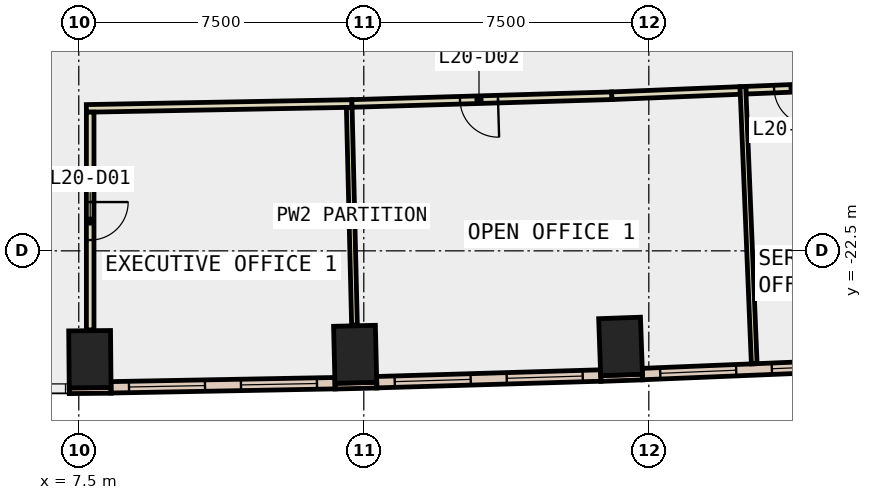
"""IFC4 building model, lengths in metres.
Left out: names, types, materials, properties, quantities, classifications, styles, units other than length and angle.
Written with IfcOpenShell. Run it as: python <this file> out.ifc"""

import sys

from ifc_helpers import new_model, si_unit, direction, frame, frame_2d, origin, origin_2d, place, context, subcontext, project, spatial, rectangle, extrude, element, fill, save


model = new_model("IFC4")
c1 = context("Model", 3, precision=1e-05, world=origin(), true_north=direction((0.0, 1.0)))
c2 = subcontext(c1, "Body", "Model", "MODEL_VIEW")
j1 = project(units=[si_unit("LENGTHUNIT", "METRE"), si_unit("PLANEANGLEUNIT", "RADIAN")], contexts=[c1])
p1 = place(None, origin())
s1 = spatial("IfcSite", under=j1, at=p1, CompositionType="ELEMENT")
p2 = place(p1, origin())
s2 = spatial("IfcBuilding", under=s1, at=p2, CompositionType="ELEMENT")
p3 = place(p2, frame((0.0, 0.0, 95.0)))
s3 = spatial("IfcBuildingStorey", under=s2, at=p3, CompositionType="ELEMENT", Elevation=95.0)
for number, where, z_axis, x_axis in (
    (1, (7.792, -25.351, -0.4), (0.0, 0.0, 1.0), (1.0, 0.009, 0.0)),
    (2, (14.773, -25.222, -0.4), (0.0, 0.0, 1.0), (1.0, 0.024, 0.0)),
    (3, (21.757, -25.015, -0.4), (0.0, 0.0, 1.0), (0.999, 0.035, 0.0)),
):
    element("IfcColumn", number, at=place(p3, frame(where, z_axis=z_axis, x_axis=x_axis)), inside=s3, PredefinedType="COLUMN", context=c2, shape_type="SweptSolid", body=[
        extrude(rectangle(XDim=1.1, YDim=1.5, at=origin_2d()), origin(), (0.0, 0.0, 1.0), 4.2),
    ])
p4 = place(p3, frame((7.249, -26.181, 0.0), z_axis=(0.0, 0.0, 1.0), x_axis=(0.99995860686, 0.009098602504, 0.0)))
e4 = element("IfcWall", 4, at=p4, inside=s3, PredefinedType="STANDARD", context=c2, shape_type="SweptSolid", body=[
    extrude(rectangle(XDim=1.1, YDim=0.15, at=frame_2d((0.55, 0.0))), origin(), (0.0, 0.0, 1.0), 3.8),
])
p5 = place(p3, frame((14.243, -26.06, 0.0), z_axis=(0.0, 0.0, 1.0), x_axis=(0.999718180159, 0.023739424163, 0.0)))
e5 = element("IfcWall", 5, at=p5, inside=s3, PredefinedType="STANDARD", context=c2, shape_type="SweptSolid", body=[
    extrude(rectangle(XDim=1.1, YDim=0.15, at=frame_2d((0.55, 0.0))), origin(), (0.0, 0.0, 1.0), 3.8),
])
p6 = place(p3, frame((21.237, -25.859, 0.0), z_axis=(0.0, 0.0, 1.0), x_axis=(0.999376638472, 0.035303462679, 0.0)))
e6 = element("IfcWall", 6, at=p6, inside=s3, PredefinedType="STANDARD", context=c2, shape_type="SweptSolid", body=[
    extrude(rectangle(XDim=1.1, YDim=0.15, at=frame_2d((0.55, 0.0))), origin(), (0.0, 0.0, 1.0), 3.8),
])
p7 = place(p3, frame((8.348, -26.091, 0.0), z_axis=(0.0, 0.0, 1.0), x_axis=(0.999828633111, 0.018512277318, 0.0)))
e7 = element("IfcWall", 7, at=p7, inside=s3, PredefinedType="STANDARD", context=c2, shape_type="SweptSolid", body=[
    extrude(rectangle(XDim=5.895, YDim=0.3, at=frame_2d((2.948, 0.0))), origin(), (0.0, 0.0, 1.0), 3.8),
])
p8 = place(p7, frame((0.474, 0.0, 0.9)))
e8 = element("IfcOpeningElement", 8, at=p8, cuts=e7, PredefinedType="OPENING", context=c2, shape_type="SweptSolid", body=[
    extrude(rectangle(XDim=2.0, YDim=2.6, at=frame_2d((1.0, 1.3))), frame((0.0, 0.16, 0.0), z_axis=(0.0, -1.0, 0.0), x_axis=(1.0, 0.0, 0.0)), (0.0, 0.0, 1.0), 0.32),
])
p9 = place(p7, frame((3.421, 0.0, 0.9)))
e9 = element("IfcOpeningElement", 9, at=p9, cuts=e7, PredefinedType="OPENING", context=c2, shape_type="SweptSolid", body=[
    extrude(rectangle(XDim=2.0, YDim=2.6, at=frame_2d((1.0, 1.3))), frame((0.0, 0.16, 0.0), z_axis=(0.0, -1.0, 0.0), x_axis=(1.0, 0.0, 0.0)), (0.0, 0.0, 1.0), 0.32),
])
p10 = place(p3, frame((15.34, -25.956, 0.0), z_axis=(0.0, 0.0, 1.0), x_axis=(0.999554487555, 0.029846715213, 0.0)))
e10 = element("IfcWall", 10, at=p10, inside=s3, PredefinedType="STANDARD", context=c2, shape_type="SweptSolid", body=[
    extrude(rectangle(XDim=5.898, YDim=0.3, at=frame_2d((2.949, 0.0))), origin(), (0.0, 0.0, 1.0), 3.8),
])
p11 = place(p10, frame((0.474, 0.0, 0.9)))
e11 = element("IfcOpeningElement", 11, at=p11, cuts=e10, PredefinedType="OPENING", context=c2, shape_type="SweptSolid", body=[
    extrude(rectangle(XDim=2.0, YDim=2.6, at=frame_2d((1.0, 1.3))), frame((0.0, 0.16, 0.0), z_axis=(0.0, -1.0, 0.0), x_axis=(1.0, 0.0, 0.0)), (0.0, 0.0, 1.0), 0.32),
])
p12 = place(p10, frame((3.423, 0.0, 0.9)))
e12 = element("IfcOpeningElement", 12, at=p12, cuts=e10, PredefinedType="OPENING", context=c2, shape_type="SweptSolid", body=[
    extrude(rectangle(XDim=2.0, YDim=2.6, at=frame_2d((1.0, 1.3))), frame((0.0, 0.16, 0.0), z_axis=(0.0, -1.0, 0.0), x_axis=(1.0, 0.0, 0.0)), (0.0, 0.0, 1.0), 0.32),
])
p13 = place(p3, frame((22.332, -25.742, 0.0), z_axis=(0.0, 0.0, 1.0), x_axis=(0.999159360905, 0.040994774244, 0.0)))
e13 = element("IfcWall", 13, at=p13, inside=s3, PredefinedType="STANDARD", context=c2, shape_type="SweptSolid", body=[
    extrude(rectangle(XDim=5.878, YDim=0.3, at=frame_2d((2.939, 0.0))), origin(), (0.0, 0.0, 1.0), 3.8),
])
p14 = place(p13, frame((0.469, 0.0, 0.9)))
e14 = element("IfcOpeningElement", 14, at=p14, cuts=e13, PredefinedType="OPENING", context=c2, shape_type="SweptSolid", body=[
    extrude(rectangle(XDim=2.0, YDim=2.6, at=frame_2d((1.0, 1.3))), frame((0.0, 0.16, 0.0), z_axis=(0.0, -1.0, 0.0), x_axis=(1.0, 0.0, 0.0)), (0.0, 0.0, 1.0), 0.32),
])
p15 = place(p13, frame((3.408, 0.0, 0.9)))
e15 = element("IfcOpeningElement", 15, at=p15, cuts=e13, PredefinedType="OPENING", context=c2, shape_type="SweptSolid", body=[
    extrude(rectangle(XDim=2.0, YDim=2.6, at=frame_2d((1.0, 1.3))), frame((0.0, 0.16, 0.0), z_axis=(0.0, -1.0, 0.0), x_axis=(1.0, 0.0, 0.0)), (0.0, 0.0, 1.0), 0.32),
])
p16 = place(p3, frame((14.689, -18.623, 0.0), z_axis=(0.0, 0.0, 1.0), x_axis=(-0.99982995049, -0.01844098976, 0.0)))
e16 = element("IfcWall", 16, at=p16, inside=s3, PredefinedType="PARTITIONING", context=c2, shape_type="SweptSolid", body=[
    extrude(rectangle(XDim=6.99, YDim=0.2, at=frame_2d((3.495, 0.0))), origin(), (0.0, 0.0, 1.0), 3.8),
])
p17 = place(p3, frame((24.904, -18.28, 0.0), z_axis=(0.0, 0.0, 1.0), x_axis=(-0.999156550882, -0.041063205305, 0.0)))
e17 = element("IfcWall", 17, at=p17, inside=s3, PredefinedType="PARTITIONING", context=c2, shape_type="SweptSolid", body=[
    extrude(rectangle(XDim=3.383, YDim=0.2, at=frame_2d((1.691, 0.0))), origin(), (0.0, 0.0, 1.0), 3.8),
])
p18 = place(p3, frame((21.524, -18.419, 0.0), z_axis=(0.0, 0.0, 1.0), x_axis=(-0.999558696746, -0.029705416334, 0.0)))
e18 = element("IfcWall", 18, at=p18, inside=s3, PredefinedType="PARTITIONING", context=c2, shape_type="SweptSolid", body=[
    extrude(rectangle(XDim=6.838, YDim=0.2, at=frame_2d((3.419, 0.0))), origin(), (0.0, 0.0, 1.0), 3.8),
])
p19 = place(p18, frame((2.994, 0.0, 0.0)))
e19 = element("IfcOpeningElement", 19, at=p19, cuts=e18, PredefinedType="OPENING", context=c2, shape_type="SweptSolid", body=[
    extrude(rectangle(XDim=1.0, YDim=2.1, at=frame_2d((0.5, 1.05))), frame((0.0, 0.11, 0.0), z_axis=(0.0, -1.0, 0.0), x_axis=(1.0, 0.0, 0.0)), (0.0, 0.0, 1.0), 0.22),
])
p20 = place(p3, frame((27.538, -18.172, 0.0), z_axis=(0.0, 0.0, 1.0), x_axis=(-0.999161261417, -0.040948427126, 0.0)))
e20 = element("IfcWall", 20, at=p20, inside=s3, PredefinedType="PARTITIONING", context=c2, shape_type="SweptSolid", body=[
    extrude(rectangle(XDim=2.486, YDim=0.2, at=frame_2d((1.243, 0.0))), origin(), (0.0, 0.0, 1.0), 3.8),
])
p21 = place(p20, frame((0.743, 0.0, 0.0)))
e21 = element("IfcOpeningElement", 21, at=p21, cuts=e20, PredefinedType="OPENING", context=c2, shape_type="SweptSolid", body=[
    extrude(rectangle(XDim=1.0, YDim=2.1, at=frame_2d((0.5, 1.05))), frame((0.0, 0.11, 0.0), z_axis=(0.0, -1.0, 0.0), x_axis=(1.0, 0.0, 0.0)), (0.0, 0.0, 1.0), 0.22),
])
p22 = place(p3, frame((7.8, -18.85, 0.0), z_axis=(0.0, 0.0, 1.0), x_axis=(0.0, -1.0, 0.0)))
e22 = element("IfcWall", 22, at=p22, inside=s3, PredefinedType="PARTITIONING", context=c2, shape_type="SweptSolid", body=[
    extrude(rectangle(XDim=5.731, YDim=0.2, at=frame_2d((2.865, 0.0))), origin(), (0.0, 0.0, 1.0), 3.8),
])
p23 = place(p22, frame((2.366, 0.0, 0.0)))
e23 = element("IfcOpeningElement", 23, at=p23, cuts=e22, PredefinedType="OPENING", context=c2, shape_type="SweptSolid", body=[
    extrude(rectangle(XDim=1.0, YDim=2.1, at=frame_2d((0.5, 1.05))), frame((0.0, 0.11, 0.0), z_axis=(0.0, -1.0, 0.0), x_axis=(1.0, 0.0, 0.0)), (0.0, 0.0, 1.0), 0.22),
])
p24 = place(p3, frame((14.617, -18.724, 0.0), z_axis=(0.0, 0.0, 1.0), x_axis=(0.02407553942, -0.999710142192, 0.0)))
e24 = element("IfcWall", 24, at=p24, inside=s3, PredefinedType="PARTITIONING", context=c2, shape_type="SweptSolid", body=[
    extrude(rectangle(XDim=5.729, YDim=0.15, at=frame_2d((2.865, 0.0))), origin(), (0.0, 0.0, 1.0), 3.8),
])
p25 = place(p3, frame((24.975, -18.177, 0.0), z_axis=(0.0, 0.0, 1.0), x_axis=(0.040934999913, -0.999161811611, 0.0)))
e25 = element("IfcWall", 25, at=p25, inside=s3, PredefinedType="PARTITIONING", context=c2, shape_type="SweptSolid", body=[
    extrude(rectangle(XDim=7.3, YDim=0.15, at=frame_2d((3.65, 0.0))), origin(), (0.0, 0.0, 1.0), 3.8),
])
p26 = place(p8, origin())
e26 = element("IfcWindow", 26, at=p26, inside=s3, PartitioningType="SINGLE_PANEL", PredefinedType="WINDOW", context=c2, shape_type="SweptSolid", body=[
    extrude(rectangle(XDim=2.0, YDim=2.6, at=frame_2d((1.0, 1.3))), frame((0.0, 0.03, 0.0), z_axis=(0.0, -1.0, 0.0), x_axis=(1.0, 0.0, 0.0)), (0.0, 0.0, 1.0), 0.06),
])
fill(e8, e26)
p27 = place(p9, origin())
e27 = element("IfcWindow", 27, at=p27, inside=s3, PartitioningType="SINGLE_PANEL", PredefinedType="WINDOW", context=c2, shape_type="SweptSolid", body=[
    extrude(rectangle(XDim=2.0, YDim=2.6, at=frame_2d((1.0, 1.3))), frame((0.0, 0.03, 0.0), z_axis=(0.0, -1.0, 0.0), x_axis=(1.0, 0.0, 0.0)), (0.0, 0.0, 1.0), 0.06),
])
fill(e9, e27)
p28 = place(p11, origin())
e28 = element("IfcWindow", 28, at=p28, inside=s3, PartitioningType="SINGLE_PANEL", PredefinedType="WINDOW", context=c2, shape_type="SweptSolid", body=[
    extrude(rectangle(XDim=2.0, YDim=2.6, at=frame_2d((1.0, 1.3))), frame((0.0, 0.03, 0.0), z_axis=(0.0, -1.0, 0.0), x_axis=(1.0, 0.0, 0.0)), (0.0, 0.0, 1.0), 0.06),
])
fill(e11, e28)
p29 = place(p12, origin())
e29 = element("IfcWindow", 29, at=p29, inside=s3, PartitioningType="SINGLE_PANEL", PredefinedType="WINDOW", context=c2, shape_type="SweptSolid", body=[
    extrude(rectangle(XDim=2.0, YDim=2.6, at=frame_2d((1.0, 1.3))), frame((0.0, 0.03, 0.0), z_axis=(0.0, -1.0, 0.0), x_axis=(1.0, 0.0, 0.0)), (0.0, 0.0, 1.0), 0.06),
])
fill(e12, e29)
p30 = place(p14, origin())
e30 = element("IfcWindow", 30, at=p30, inside=s3, PartitioningType="SINGLE_PANEL", PredefinedType="WINDOW", context=c2, shape_type="SweptSolid", body=[
    extrude(rectangle(XDim=2.0, YDim=2.6, at=frame_2d((1.0, 1.3))), frame((0.0, 0.03, 0.0), z_axis=(0.0, -1.0, 0.0), x_axis=(1.0, 0.0, 0.0)), (0.0, 0.0, 1.0), 0.06),
])
fill(e14, e30)
p31 = place(p15, origin())
e31 = element("IfcWindow", 31, at=p31, inside=s3, PartitioningType="SINGLE_PANEL", PredefinedType="WINDOW", context=c2, shape_type="SweptSolid", body=[
    extrude(rectangle(XDim=2.0, YDim=2.6, at=frame_2d((1.0, 1.3))), frame((0.0, 0.03, 0.0), z_axis=(0.0, -1.0, 0.0), x_axis=(1.0, 0.0, 0.0)), (0.0, 0.0, 1.0), 0.06),
])
fill(e15, e31)
p32 = place(p23, origin())
e32 = element("IfcDoor", 32, at=p32, inside=s3, OperationType="SINGLE_SWING_LEFT", PredefinedType="DOOR", context=c2, shape_type="SweptSolid", body=[
    extrude(rectangle(XDim=1.0, YDim=2.1, at=frame_2d((0.5, 1.05))), frame((0.0, 0.025, 0.0), z_axis=(0.0, -1.0, 0.0), x_axis=(1.0, 0.0, 0.0)), (0.0, 0.0, 1.0), 0.05),
])
fill(e23, e32)
p33 = place(p19, origin())
e33 = element("IfcDoor", 33, at=p33, inside=s3, OperationType="SINGLE_SWING_LEFT", PredefinedType="DOOR", context=c2, shape_type="SweptSolid", body=[
    extrude(rectangle(XDim=1.0, YDim=2.1, at=frame_2d((0.5, 1.05))), frame((0.0, 0.025, 0.0), z_axis=(0.0, -1.0, 0.0), x_axis=(1.0, 0.0, 0.0)), (0.0, 0.0, 1.0), 0.05),
])
fill(e19, e33)
p34 = place(p21, origin())
e34 = element("IfcDoor", 34, at=p34, inside=s3, OperationType="SINGLE_SWING_LEFT", PredefinedType="DOOR", context=c2, shape_type="SweptSolid", body=[
    extrude(rectangle(XDim=1.0, YDim=2.1, at=frame_2d((0.5, 1.05))), frame((0.0, 0.025, 0.0), z_axis=(0.0, -1.0, 0.0), x_axis=(1.0, 0.0, 0.0)), (0.0, 0.0, 1.0), 0.05),
])
fill(e21, e34)
save(model, sys.argv[1])
